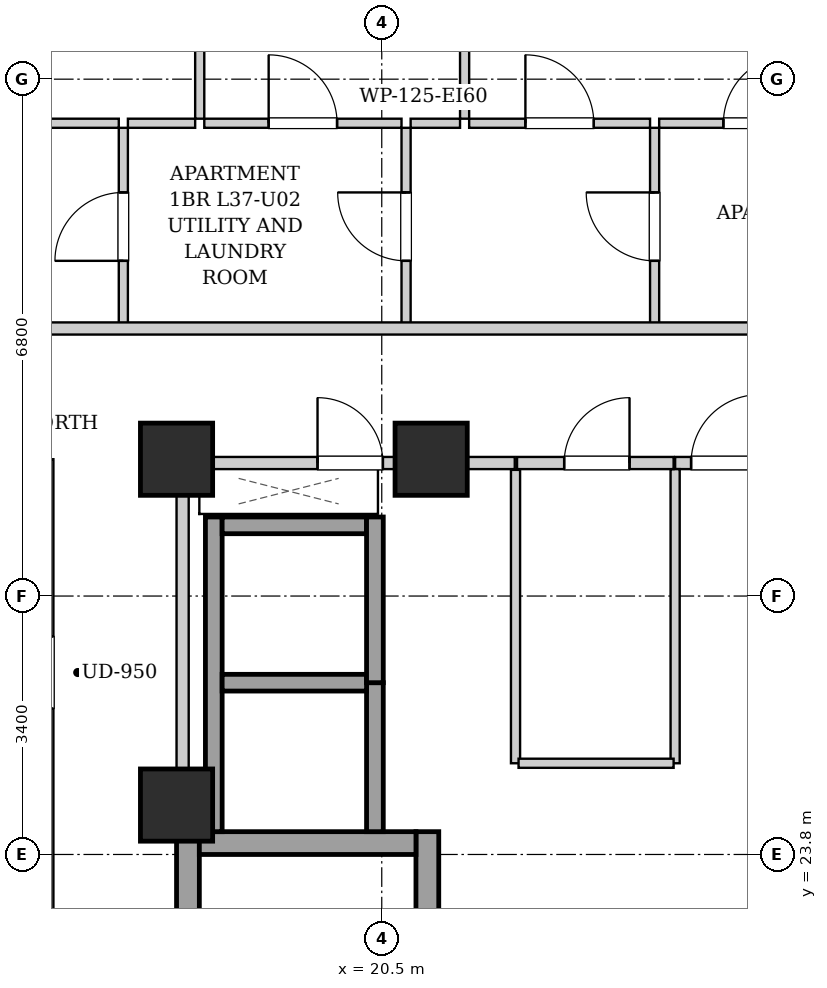
"""IFC4 building model, lengths in metres.
Left out: names, types, materials, properties, quantities, classifications, styles, units other than length and angle.
Written with IfcOpenShell. Run it as: python <this file> out.ifc"""

import sys

from ifc_helpers import new_model, si_unit, direction, frame, frame_2d, origin, origin_2d, place, context, subcontext, project, spatial, rectangle, extrude, element, fill, save


model = new_model("IFC4")
c1 = context("Model", 3, precision=1e-05, world=origin(), true_north=direction((0.0, 1.0)))
c2 = subcontext(c1, "Body", "Model", "MODEL_VIEW")
j1 = project(units=[si_unit("LENGTHUNIT", "METRE"), si_unit("PLANEANGLEUNIT", "RADIAN")], contexts=[c1])
p1 = place(None, origin())
s1 = spatial("IfcSite", under=j1, at=p1, CompositionType="ELEMENT")
p2 = place(p1, origin())
s2 = spatial("IfcBuilding", under=s1, at=p2, CompositionType="ELEMENT")
p3 = place(p2, frame((0.0, 0.0, 130.9)))
s3 = spatial("IfcBuildingStorey", under=s2, at=p3, CompositionType="ELEMENT", Elevation=130.9)
for number, where, z_axis, x_axis in (
    (1, (17.8, 29.0, 0.0), (0.0, 0.0, 1.0), (1.0, 0.0, 0.0)),
    (2, (21.15, 29.0, 0.0), (0.0, 0.0, 1.0), (1.0, 0.0, 0.0)),
    (3, (17.8, 24.45, 0.0), (0.0, 0.0, 1.0), (1.0, 0.0, 0.0)),
):
    element("IfcColumn", number, at=place(p3, frame(where, z_axis=z_axis, x_axis=x_axis)), inside=s3, PredefinedType="COLUMN", context=c2, shape_type="SweptSolid", body=[
        extrude(rectangle(XDim=0.95, YDim=0.95, at=origin_2d()), origin(), (0.0, 0.0, 1.0), 3.25),
    ])
for number, where, z_axis, x_axis in (
    (4, (17.95, 15.1, 0.0), (0.0, 0.0, 1.0), (0.0, 1.0, 0.0)),
    (5, (21.1, 15.1, 0.0), (0.0, 0.0, 1.0), (0.0, 1.0, 0.0)),
):
    element("IfcWall", number, at=place(p3, frame(where, z_axis=z_axis, x_axis=x_axis)), inside=s3, PredefinedType="SHEAR", context=c2, shape_type="SweptSolid", body=[
        extrude(rectangle(XDim=9.0, YDim=0.3, at=frame_2d((4.5, 0.0))), origin(), (0.0, 0.0, 1.0), 2.99),
    ])
p4 = place(p3, frame((18.1, 23.95, 0.0), z_axis=(0.0, 0.0, 1.0), x_axis=(1.0, 0.0, 0.0)))
e6 = element("IfcWall", 6, at=p4, inside=s3, PredefinedType="SHEAR", context=c2, shape_type="SweptSolid", body=[
    extrude(rectangle(XDim=2.85, YDim=0.3, at=frame_2d((1.425, 0.0))), origin(), (0.0, 0.0, 1.0), 2.99),
])
p5 = place(p3, frame((18.29, 24.1, 0.0), z_axis=(0.0, 0.0, 1.0), x_axis=(0.0, 1.0, 0.0)))
e7 = element("IfcWall", 7, at=p5, inside=s3, PredefinedType="SHEAR", context=c2, shape_type="SweptSolid", body=[
    extrude(rectangle(XDim=4.14, YDim=0.22, at=frame_2d((2.07, 0.0))), origin(), (0.0, 0.0, 1.0), 2.99),
])
p6 = place(p3, frame((20.41, 24.1, 0.0), z_axis=(0.0, 0.0, 1.0), x_axis=(0.0, 1.0, 0.0)))
e8 = element("IfcWall", 8, at=p6, inside=s3, PredefinedType="SHEAR", context=c2, shape_type="SweptSolid", body=[
    extrude(rectangle(XDim=1.96, YDim=0.22, at=frame_2d((0.98, 0.0))), origin(), (0.0, 0.0, 1.0), 2.99),
])
for number, where, z_axis, x_axis in (
    (9, (18.4, 26.06, 0.0), (0.0, 0.0, 1.0), (1.0, 0.0, 0.0)),
    (10, (18.4, 28.13, 0.0), (0.0, 0.0, 1.0), (1.0, 0.0, 0.0)),
):
    element("IfcWall", number, at=place(p3, frame(where, z_axis=z_axis, x_axis=x_axis)), inside=s3, PredefinedType="SHEAR", context=c2, shape_type="SweptSolid", body=[
        extrude(rectangle(XDim=1.9, YDim=0.22, at=frame_2d((0.95, 0.0))), origin(), (0.0, 0.0, 1.0), 2.99),
    ])
p7 = place(p3, frame((20.41, 26.06, 0.0), z_axis=(0.0, 0.0, 1.0), x_axis=(0.0, 1.0, 0.0)))
e11 = element("IfcWall", 11, at=p7, inside=s3, PredefinedType="SHEAR", context=c2, shape_type="SweptSolid", body=[
    extrude(rectangle(XDim=2.18, YDim=0.22, at=frame_2d((1.09, 0.0))), origin(), (0.0, 0.0, 1.0), 2.99),
])
p8 = place(p3, frame((17.88, 24.12, 0.0), z_axis=(0.0, 0.0, 1.0), x_axis=(0.0, 1.0, 0.0)))
e12 = element("IfcWall", 12, at=p8, inside=s3, PredefinedType="PARTITIONING", context=c2, shape_type="SweptSolid", body=[
    extrude(rectangle(XDim=4.76, YDim=0.16, at=frame_2d((2.38, 0.0))), origin(), (0.0, 0.0, 1.0), 2.99),
])
p9 = place(p3, frame((24.36, 28.95, 0.0), z_axis=(0.0, 0.0, 1.0), x_axis=(1.0, 0.0, 0.0)))
e13 = element("IfcWall", 13, at=p9, inside=s3, PredefinedType="PARTITIONING", context=c2, shape_type="SweptSolid", body=[
    extrude(rectangle(XDim=1.32, YDim=0.16, at=frame_2d((0.66, 0.0))), origin(), (0.0, 0.0, 1.0), 2.426),
])
p10 = place(p9, frame((0.21, 0.0, 0.0)))
e14 = element("IfcOpeningElement", 14, at=p10, cuts=e13, PredefinedType="OPENING", context=c2, shape_type="SweptSolid", body=[
    extrude(rectangle(XDim=0.9, YDim=2.05, at=frame_2d((0.45, 1.025))), frame((0.0, 0.09, 0.0), z_axis=(0.0, -1.0, 0.0), x_axis=(1.0, 0.0, 0.0)), (0.0, 0.0, 1.0), 0.18),
])
p11 = place(p3, frame((17.96, 28.95, 0.0), z_axis=(0.0, 0.0, 1.0), x_axis=(1.0, 0.0, 0.0)))
e15 = element("IfcWall", 15, at=p11, inside=s3, PredefinedType="PARTITIONING", context=c2, shape_type="SweptSolid", body=[
    extrude(rectangle(XDim=4.29, YDim=0.16, at=frame_2d((2.145, 0.0))), origin(), (0.0, 0.0, 1.0), 2.426),
])
p12 = place(p11, frame((1.695, 0.0, 0.0)))
e16 = element("IfcOpeningElement", 16, at=p12, cuts=e15, PredefinedType="OPENING", context=c2, shape_type="SweptSolid", body=[
    extrude(rectangle(XDim=0.86, YDim=2.05, at=frame_2d((0.43, 1.025))), frame((0.0, 0.09, 0.0), z_axis=(0.0, -1.0, 0.0), x_axis=(1.0, 0.0, 0.0)), (0.0, 0.0, 1.0), 0.18),
])
p13 = place(p3, frame((24.36, 25.0, 0.0), z_axis=(0.0, 0.0, 1.0), x_axis=(0.0, 1.0, 0.0)))
e17 = element("IfcWall", 17, at=p13, inside=s3, PredefinedType="PARTITIONING", context=c2, shape_type="SweptSolid", body=[
    extrude(rectangle(XDim=3.87, YDim=0.12, at=frame_2d((1.935, 0.0))), origin(), (0.0, 0.0, 1.0), 2.99),
])
p14 = place(p3, frame((22.26, 25.0, 0.0), z_axis=(0.0, 0.0, 1.0), x_axis=(0.0, 1.0, 0.0)))
e18 = element("IfcWall", 18, at=p14, inside=s3, PredefinedType="PARTITIONING", context=c2, shape_type="SweptSolid", body=[
    extrude(rectangle(XDim=3.86, YDim=0.12, at=frame_2d((1.93, 0.0))), origin(), (0.0, 0.0, 1.0), 2.99),
])
p15 = place(p3, frame((22.3, 25.0, 0.0), z_axis=(0.0, 0.0, 1.0), x_axis=(1.0, 0.0, 0.0)))
e19 = element("IfcWall", 19, at=p15, inside=s3, PredefinedType="PARTITIONING", context=c2, shape_type="SweptSolid", body=[
    extrude(rectangle(XDim=2.04, YDim=0.12, at=frame_2d((1.02, 0.0))), origin(), (0.0, 0.0, 1.0), 2.99),
])
p16 = place(p3, frame((22.28, 28.95, 0.0), z_axis=(0.0, 0.0, 1.0), x_axis=(1.0, 0.0, 0.0)))
e20 = element("IfcWall", 20, at=p16, inside=s3, PredefinedType="PARTITIONING", context=c2, shape_type="SweptSolid", body=[
    extrude(rectangle(XDim=2.06, YDim=0.16, at=frame_2d((1.03, 0.0))), origin(), (0.0, 0.0, 1.0), 2.426),
])
p17 = place(p16, frame((0.62, 0.0, 0.0)))
e21 = element("IfcOpeningElement", 21, at=p17, cuts=e20, PredefinedType="OPENING", context=c2, shape_type="SweptSolid", body=[
    extrude(rectangle(XDim=0.86, YDim=2.05, at=frame_2d((0.43, 1.025))), frame((0.0, 0.09, 0.0), z_axis=(0.0, -1.0, 0.0), x_axis=(1.0, 0.0, 0.0)), (0.0, 0.0, 1.0), 0.18),
])
p18 = place(p3, frame((17.1, 30.76, 0.0), z_axis=(0.0, 0.0, 1.0), x_axis=(0.0, 1.0, 0.0)))
e22 = element("IfcWall", 22, at=p18, inside=s3, PredefinedType="PARTITIONING", context=c2, shape_type="SweptSolid", body=[
    extrude(rectangle(XDim=2.6, YDim=0.12, at=frame_2d((1.3, 0.0))), origin(), (0.0, 0.0, 1.0), 2.99),
])
p19 = place(p18, frame((0.85, 0.0, 0.0)))
e23 = element("IfcOpeningElement", 23, at=p19, cuts=e22, PredefinedType="OPENING", context=c2, shape_type="SweptSolid", body=[
    extrude(rectangle(XDim=0.9, YDim=2.05, at=frame_2d((0.45, 1.025))), frame((0.0, 0.07, 0.0), z_axis=(0.0, -1.0, 0.0), x_axis=(1.0, 0.0, 0.0)), (0.0, 0.0, 1.0), 0.14),
])
p20 = place(p3, frame((14.26, 33.42, 0.0), z_axis=(0.0, 0.0, 1.0), x_axis=(1.0, 0.0, 0.0)))
e24 = element("IfcWall", 24, at=p20, inside=s3, PredefinedType="PARTITIONING", context=c2, shape_type="SweptSolid", body=[
    extrude(rectangle(XDim=2.78, YDim=0.12, at=frame_2d((1.39, 0.0))), origin(), (0.0, 0.0, 1.0), 2.99),
])
p21 = place(p20, frame((0.94, 0.0, 0.0)))
e25 = element("IfcOpeningElement", 25, at=p21, cuts=e24, PredefinedType="OPENING", context=c2, shape_type="SweptSolid", body=[
    extrude(rectangle(XDim=0.9, YDim=2.05, at=frame_2d((0.45, 1.025))), frame((0.0, 0.07, 0.0), z_axis=(0.0, -1.0, 0.0), x_axis=(1.0, 0.0, 0.0)), (0.0, 0.0, 1.0), 0.14),
])
p22 = place(p3, frame((20.82, 30.76, 0.0), z_axis=(0.0, 0.0, 1.0), x_axis=(0.0, 1.0, 0.0)))
e26 = element("IfcWall", 26, at=p22, inside=s3, PredefinedType="PARTITIONING", context=c2, shape_type="SweptSolid", body=[
    extrude(rectangle(XDim=2.6, YDim=0.12, at=frame_2d((1.3, 0.0))), origin(), (0.0, 0.0, 1.0), 2.99),
])
p23 = place(p22, frame((0.85, 0.0, 0.0)))
e27 = element("IfcOpeningElement", 27, at=p23, cuts=e26, PredefinedType="OPENING", context=c2, shape_type="SweptSolid", body=[
    extrude(rectangle(XDim=0.9, YDim=2.05, at=frame_2d((0.45, 1.025))), frame((0.0, 0.07, 0.0), z_axis=(0.0, -1.0, 0.0), x_axis=(1.0, 0.0, 0.0)), (0.0, 0.0, 1.0), 0.14),
])
p24 = place(p3, frame((17.16, 33.42, 0.0), z_axis=(0.0, 0.0, 1.0), x_axis=(1.0, 0.0, 0.0)))
e28 = element("IfcWall", 28, at=p24, inside=s3, PredefinedType="PARTITIONING", context=c2, shape_type="SweptSolid", body=[
    extrude(rectangle(XDim=0.885, YDim=0.12, at=frame_2d((0.442, 0.0))), origin(), (0.0, 0.0, 1.0), 2.99),
])
p25 = place(p3, frame((18.165, 33.42, 0.0), z_axis=(0.0, 0.0, 1.0), x_axis=(1.0, 0.0, 0.0)))
e29 = element("IfcWall", 29, at=p25, inside=s3, PredefinedType="PARTITIONING", context=c2, shape_type="SweptSolid", body=[
    extrude(rectangle(XDim=2.595, YDim=0.12, at=frame_2d((1.297, 0.0))), origin(), (0.0, 0.0, 1.0), 2.99),
])
p26 = place(p25, frame((0.847, 0.0, 0.0)))
e30 = element("IfcOpeningElement", 30, at=p26, cuts=e29, PredefinedType="OPENING", context=c2, shape_type="SweptSolid", body=[
    extrude(rectangle(XDim=0.9, YDim=2.05, at=frame_2d((0.45, 1.025))), frame((0.0, 0.07, 0.0), z_axis=(0.0, -1.0, 0.0), x_axis=(1.0, 0.0, 0.0)), (0.0, 0.0, 1.0), 0.14),
])
p27 = place(p3, frame((24.09, 30.76, 0.0), z_axis=(0.0, 0.0, 1.0), x_axis=(0.0, 1.0, 0.0)))
e31 = element("IfcWall", 31, at=p27, inside=s3, PredefinedType="PARTITIONING", context=c2, shape_type="SweptSolid", body=[
    extrude(rectangle(XDim=2.6, YDim=0.12, at=frame_2d((1.3, 0.0))), origin(), (0.0, 0.0, 1.0), 2.99),
])
p28 = place(p27, frame((0.85, 0.0, 0.0)))
e32 = element("IfcOpeningElement", 32, at=p28, cuts=e31, PredefinedType="OPENING", context=c2, shape_type="SweptSolid", body=[
    extrude(rectangle(XDim=0.9, YDim=2.05, at=frame_2d((0.45, 1.025))), frame((0.0, 0.07, 0.0), z_axis=(0.0, -1.0, 0.0), x_axis=(1.0, 0.0, 0.0)), (0.0, 0.0, 1.0), 0.14),
])
p29 = place(p3, frame((20.88, 33.42, 0.0), z_axis=(0.0, 0.0, 1.0), x_axis=(1.0, 0.0, 0.0)))
e33 = element("IfcWall", 33, at=p29, inside=s3, PredefinedType="PARTITIONING", context=c2, shape_type="SweptSolid", body=[
    extrude(rectangle(XDim=0.65, YDim=0.12, at=frame_2d((0.325, 0.0))), origin(), (0.0, 0.0, 1.0), 2.99),
])
p30 = place(p3, frame((21.65, 33.42, 0.0), z_axis=(0.0, 0.0, 1.0), x_axis=(1.0, 0.0, 0.0)))
e34 = element("IfcWall", 34, at=p30, inside=s3, PredefinedType="PARTITIONING", context=c2, shape_type="SweptSolid", body=[
    extrude(rectangle(XDim=2.38, YDim=0.12, at=frame_2d((1.19, 0.0))), origin(), (0.0, 0.0, 1.0), 2.99),
])
p31 = place(p30, frame((0.74, 0.0, 0.0)))
e35 = element("IfcOpeningElement", 35, at=p31, cuts=e34, PredefinedType="OPENING", context=c2, shape_type="SweptSolid", body=[
    extrude(rectangle(XDim=0.9, YDim=2.05, at=frame_2d((0.45, 1.025))), frame((0.0, 0.07, 0.0), z_axis=(0.0, -1.0, 0.0), x_axis=(1.0, 0.0, 0.0)), (0.0, 0.0, 1.0), 0.14),
])
p32 = place(p3, frame((24.15, 33.42, 0.0), z_axis=(0.0, 0.0, 1.0), x_axis=(1.0, 0.0, 0.0)))
e36 = element("IfcWall", 36, at=p32, inside=s3, PredefinedType="PARTITIONING", context=c2, shape_type="SweptSolid", body=[
    extrude(rectangle(XDim=2.59, YDim=0.12, at=frame_2d((1.295, 0.0))), origin(), (0.0, 0.0, 1.0), 2.99),
])
p33 = place(p32, frame((0.845, 0.0, 0.0)))
e37 = element("IfcOpeningElement", 37, at=p33, cuts=e36, PredefinedType="OPENING", context=c2, shape_type="SweptSolid", body=[
    extrude(rectangle(XDim=0.9, YDim=2.05, at=frame_2d((0.45, 1.025))), frame((0.0, 0.07, 0.0), z_axis=(0.0, -1.0, 0.0), x_axis=(1.0, 0.0, 0.0)), (0.0, 0.0, 1.0), 0.14),
])
p34 = place(p3, frame((18.105, 33.48, 0.0), z_axis=(0.0, 0.0, 1.0), x_axis=(0.0, 1.0, 0.0)))
e38 = element("IfcWall", 38, at=p34, inside=s3, PredefinedType="PARTITIONING", context=c2, shape_type="SweptSolid", body=[
    extrude(rectangle(XDim=9.54, YDim=0.12, at=frame_2d((4.77, 0.0))), origin(), (0.0, 0.0, 1.0), 2.99),
])
p35 = place(p34, frame((4.305, 0.0, 0.0)))
e39 = element("IfcOpeningElement", 39, at=p35, cuts=e38, PredefinedType="OPENING", context=c2, shape_type="SweptSolid", body=[
    extrude(rectangle(XDim=0.9, YDim=2.05, at=frame_2d((0.45, 1.025))), frame((0.0, 0.07, 0.0), z_axis=(0.0, -1.0, 0.0), x_axis=(1.0, 0.0, 0.0)), (0.0, 0.0, 1.0), 0.14),
])
p36 = place(p3, frame((21.59, 33.48, 0.0), z_axis=(0.0, 0.0, 1.0), x_axis=(0.0, 1.0, 0.0)))
e40 = element("IfcWall", 40, at=p36, inside=s3, PredefinedType="PARTITIONING", context=c2, shape_type="SweptSolid", body=[
    extrude(rectangle(XDim=9.54, YDim=0.12, at=frame_2d((4.77, 0.0))), origin(), (0.0, 0.0, 1.0), 2.99),
])
p37 = place(p36, frame((4.305, 0.0, 0.0)))
e41 = element("IfcOpeningElement", 41, at=p37, cuts=e40, PredefinedType="OPENING", context=c2, shape_type="SweptSolid", body=[
    extrude(rectangle(XDim=0.9, YDim=2.05, at=frame_2d((0.45, 1.025))), frame((0.0, 0.07, 0.0), z_axis=(0.0, -1.0, 0.0), x_axis=(1.0, 0.0, 0.0)), (0.0, 0.0, 1.0), 0.14),
])
p38 = place(p3, frame((10.05, 30.72, 0.0), z_axis=(0.0, 0.0, 1.0), x_axis=(1.0, 0.0, 0.0)))
e42 = element("IfcWall", 42, at=p38, inside=s3, PredefinedType="PARTITIONING", context=c2, shape_type="SweptSolid", body=[
    extrude(rectangle(XDim=27.7, YDim=0.16, at=frame_2d((13.85, 0.0))), origin(), (0.0, 0.0, 1.0), 2.99),
])
p39 = place(p38, frame((4.295, 0.0, 0.0)))
e43 = element("IfcOpeningElement", 43, at=p39, cuts=e42, PredefinedType="OPENING", context=c2, shape_type="SweptSolid", body=[
    extrude(rectangle(XDim=0.95, YDim=2.1, at=frame_2d((0.475, 1.05))), frame((0.0, 0.09, 0.0), z_axis=(0.0, -1.0, 0.0), x_axis=(1.0, 0.0, 0.0)), (0.0, 0.0, 1.0), 0.18),
])
p40 = place(p38, frame((23.785, 0.0, 0.0)))
e44 = element("IfcOpeningElement", 44, at=p40, cuts=e42, PredefinedType="OPENING", context=c2, shape_type="SweptSolid", body=[
    extrude(rectangle(XDim=0.95, YDim=2.1, at=frame_2d((0.475, 1.05))), frame((0.0, 0.09, 0.0), z_axis=(0.0, -1.0, 0.0), x_axis=(1.0, 0.0, 0.0)), (0.0, 0.0, 1.0), 0.18),
])
p41 = place(p3, frame((16.1, 15.07, 0.0), z_axis=(0.0, 0.0, 1.0), x_axis=(0.0, 1.0, 0.0)))
e45 = element("IfcWall", 45, at=p41, inside=s3, PredefinedType="PARTITIONING", context=c2, shape_type="SweptSolid", body=[
    extrude(rectangle(XDim=13.93, YDim=0.16, at=frame_2d((6.965, 0.0))), origin(), (0.0, 0.0, 1.0), 2.99),
])
p42 = place(p41, frame((3.608, 0.0, 0.0)))
e46 = element("IfcOpeningElement", 46, at=p42, cuts=e45, PredefinedType="OPENING", context=c2, shape_type="SweptSolid", body=[
    extrude(rectangle(XDim=0.95, YDim=2.1, at=frame_2d((0.475, 1.05))), frame((0.0, 0.09, 0.0), z_axis=(0.0, -1.0, 0.0), x_axis=(1.0, 0.0, 0.0)), (0.0, 0.0, 1.0), 0.18),
])
p43 = place(p41, frame((10.649, 0.0, 0.0)))
e47 = element("IfcOpeningElement", 47, at=p43, cuts=e45, PredefinedType="OPENING", context=c2, shape_type="SweptSolid", body=[
    extrude(rectangle(XDim=0.95, YDim=2.1, at=frame_2d((0.475, 1.05))), frame((0.0, 0.09, 0.0), z_axis=(0.0, -1.0, 0.0), x_axis=(1.0, 0.0, 0.0)), (0.0, 0.0, 1.0), 0.18),
])
p44 = place(p10, origin())
e48 = element("IfcDoor", 48, at=p44, inside=s3, OperationType="SINGLE_SWING_RIGHT", PredefinedType="DOOR", context=c2, shape_type="SweptSolid", body=[
    extrude(rectangle(XDim=0.9, YDim=2.05, at=frame_2d((0.45, 1.025))), frame((0.0, 0.025, 0.0), z_axis=(0.0, -1.0, 0.0), x_axis=(1.0, 0.0, 0.0)), (0.0, 0.0, 1.0), 0.05),
])
fill(e14, e48)
p45 = place(p12, origin())
e49 = element("IfcDoor", 49, at=p45, inside=s3, OperationType="SINGLE_SWING_LEFT", PredefinedType="DOOR", context=c2, shape_type="SweptSolid", body=[
    extrude(rectangle(XDim=0.86, YDim=2.05, at=frame_2d((0.43, 1.025))), frame((0.0, 0.025, 0.0), z_axis=(0.0, -1.0, 0.0), x_axis=(1.0, 0.0, 0.0)), (0.0, 0.0, 1.0), 0.05),
])
fill(e16, e49)
p46 = place(p17, origin())
e50 = element("IfcDoor", 50, at=p46, inside=s3, OperationType="SINGLE_SWING_RIGHT", PredefinedType="DOOR", context=c2, shape_type="SweptSolid", body=[
    extrude(rectangle(XDim=0.86, YDim=2.05, at=frame_2d((0.43, 1.025))), frame((0.0, 0.025, 0.0), z_axis=(0.0, -1.0, 0.0), x_axis=(1.0, 0.0, 0.0)), (0.0, 0.0, 1.0), 0.05),
])
fill(e21, e50)
p47 = place(p19, origin())
e51 = element("IfcDoor", 51, at=p47, inside=s3, OperationType="SINGLE_SWING_LEFT", PredefinedType="DOOR", context=c2, shape_type="SweptSolid", body=[
    extrude(rectangle(XDim=0.9, YDim=2.05, at=frame_2d((0.45, 1.025))), frame((0.0, 0.025, 0.0), z_axis=(0.0, -1.0, 0.0), x_axis=(1.0, 0.0, 0.0)), (0.0, 0.0, 1.0), 0.05),
])
fill(e23, e51)
p48 = place(p23, origin())
e52 = element("IfcDoor", 52, at=p48, inside=s3, OperationType="SINGLE_SWING_RIGHT", PredefinedType="DOOR", context=c2, shape_type="SweptSolid", body=[
    extrude(rectangle(XDim=0.9, YDim=2.05, at=frame_2d((0.45, 1.025))), frame((0.0, 0.025, 0.0), z_axis=(0.0, -1.0, 0.0), x_axis=(1.0, 0.0, 0.0)), (0.0, 0.0, 1.0), 0.05),
])
fill(e27, e52)
p49 = place(p26, origin())
e53 = element("IfcDoor", 53, at=p49, inside=s3, OperationType="SINGLE_SWING_LEFT", PredefinedType="DOOR", context=c2, shape_type="SweptSolid", body=[
    extrude(rectangle(XDim=0.9, YDim=2.05, at=frame_2d((0.45, 1.025))), frame((0.0, 0.025, 0.0), z_axis=(0.0, -1.0, 0.0), x_axis=(1.0, 0.0, 0.0)), (0.0, 0.0, 1.0), 0.05),
])
fill(e30, e53)
p50 = place(p28, origin())
e54 = element("IfcDoor", 54, at=p50, inside=s3, OperationType="SINGLE_SWING_RIGHT", PredefinedType="DOOR", context=c2, shape_type="SweptSolid", body=[
    extrude(rectangle(XDim=0.9, YDim=2.05, at=frame_2d((0.45, 1.025))), frame((0.0, 0.025, 0.0), z_axis=(0.0, -1.0, 0.0), x_axis=(1.0, 0.0, 0.0)), (0.0, 0.0, 1.0), 0.05),
])
fill(e32, e54)
p51 = place(p31, origin())
e55 = element("IfcDoor", 55, at=p51, inside=s3, OperationType="SINGLE_SWING_LEFT", PredefinedType="DOOR", context=c2, shape_type="SweptSolid", body=[
    extrude(rectangle(XDim=0.9, YDim=2.05, at=frame_2d((0.45, 1.025))), frame((0.0, 0.025, 0.0), z_axis=(0.0, -1.0, 0.0), x_axis=(1.0, 0.0, 0.0)), (0.0, 0.0, 1.0), 0.05),
])
fill(e35, e55)
p52 = place(p33, origin())
e56 = element("IfcDoor", 56, at=p52, inside=s3, OperationType="SINGLE_SWING_RIGHT", PredefinedType="DOOR", context=c2, shape_type="SweptSolid", body=[
    extrude(rectangle(XDim=0.9, YDim=2.05, at=frame_2d((0.45, 1.025))), frame((0.0, 0.025, 0.0), z_axis=(0.0, -1.0, 0.0), x_axis=(1.0, 0.0, 0.0)), (0.0, 0.0, 1.0), 0.05),
])
fill(e37, e56)
save(model, sys.argv[1])
